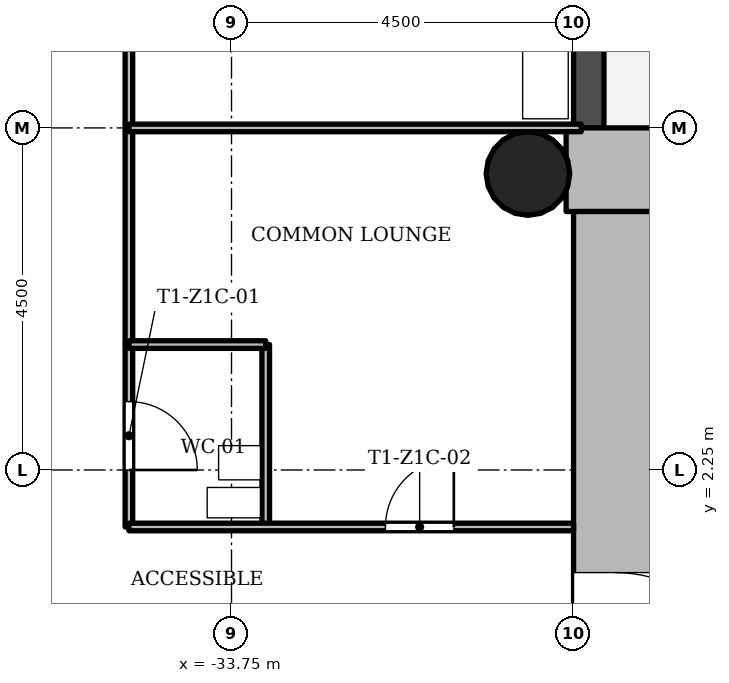
"""IFC4 building model, lengths in metres.
Left out: names, types, materials, properties, quantities, classifications, styles, units other than length and angle.
Written with IfcOpenShell. Run it as: python <this file> out.ifc"""

import sys

from ifc_helpers import new_model, si_unit, direction, frame, frame_2d, origin, origin_2d, place, context, subcontext, project, spatial, rectangle, hollow_circle, extrude, element, fill, save


model = new_model("IFC4")
c1 = context("Model", 3, precision=1e-05, world=origin(), true_north=direction((0.0, 1.0)))
c2 = subcontext(c1, "Body", "Model", "MODEL_VIEW")
j1 = project(units=[si_unit("LENGTHUNIT", "METRE"), si_unit("PLANEANGLEUNIT", "RADIAN")], contexts=[c1])
p1 = place(None, origin())
s1 = spatial("IfcSite", under=j1, at=p1, CompositionType="ELEMENT")
p2 = place(p1, origin())
s2 = spatial("IfcBuilding", under=s1, at=p2, CompositionType="ELEMENT")
p3 = place(p2, frame((0.0, 0.0, 51.7)))
s3 = spatial("IfcBuildingStorey", under=s2, at=p3, CompositionType="ELEMENT", Elevation=51.7)
p4 = place(p3, frame((-21.35, 6.2, 0.0), z_axis=(0.0, 0.0, 1.0), x_axis=(-1.0, 0.0, 0.0)))
e1 = element("IfcWall", 1, at=p4, inside=s3, PredefinedType="SHEAR", context=c2, shape_type="SweptSolid", body=[
    extrude(rectangle(XDim=7.998, YDim=1.1, at=frame_2d((3.999, 0.0))), origin(), (0.0, 0.0, 1.0), 3.4),
])
p5 = place(p3, frame((-28.7, 5.65, 0.0), z_axis=(0.0, 0.0, 1.0), x_axis=(0.0, -1.0, 0.0)))
e2 = element("IfcWall", 2, at=p5, inside=s3, PredefinedType="SHEAR", context=c2, shape_type="SweptSolid", body=[
    extrude(rectangle(XDim=12.4, YDim=1.1, at=frame_2d((6.2, 0.0))), origin(), (0.0, 0.0, 1.0), 3.4),
])
p6 = place(p5, frame((4.75, 0.0, 0.0)))
e3 = element("IfcOpeningElement", 3, at=p6, cuts=e2, PredefinedType="OPENING", context=c2, shape_type="SweptSolid", body=[
    extrude(rectangle(XDim=1.8, YDim=2.1, at=frame_2d((0.9, 1.05))), frame((0.0, 0.56, 0.0), z_axis=(0.0, -1.0, 0.0), x_axis=(1.0, 0.0, 0.0)), (0.0, 0.0, 1.0), 1.12),
])
p7 = place(p3, frame((-29.85, 6.15, 0.0), z_axis=(0.0, 0.0, 1.0), x_axis=(1.0, 0.0, 0.0)))
e4 = element("IfcColumn", 4, at=p7, inside=s3, PredefinedType="COLUMN", context=c2, shape_type="SweptSolid", body=[
    extrude(hollow_circle(Radius=0.55, WallThickness=0.04, at=origin_2d()), origin(), (0.0, 0.0, 1.0), 3.4),
])
p8 = place(p3, frame((-29.05, 6.75, -0.02), z_axis=(0.0, 0.0, 1.0), x_axis=(0.0, 1.0, 0.0)))
e5 = element("IfcWall", 5, at=p8, inside=s3, PredefinedType="STANDARD", context=c2, shape_type="SweptSolid", body=[
    extrude(rectangle(XDim=4.5, YDim=0.4, at=frame_2d((2.25, 0.0))), origin(), (0.0, 0.0, 1.0), 3.12),
])
p9 = place(p8, frame((1.35, 0.0, 0.02)))
e6 = element("IfcOpeningElement", 6, at=p9, cuts=e5, PredefinedType="OPENING", context=c2, shape_type="SweptSolid", body=[
    extrude(rectangle(XDim=1.8, YDim=2.1, at=frame_2d((0.9, 1.05))), frame((0.0, 0.21, 0.0), z_axis=(0.0, -1.0, 0.0), x_axis=(1.0, 0.0, 0.0)), (0.0, 0.0, 1.0), 0.42),
])
p10 = place(p3, frame((-35.1, 1.5, 0.0), z_axis=(0.0, 0.0, 1.0), x_axis=(0.0, 1.0, 0.0)))
e7 = element("IfcWall", 7, at=p10, inside=s3, PredefinedType="PARTITIONING", context=c2, shape_type="SweptSolid", body=[
    extrude(rectangle(XDim=7.05, YDim=0.1, at=frame_2d((3.525, 0.0))), origin(), (0.0, 0.0, 1.0), 3.0),
])
p11 = place(p10, frame((0.75, 0.0, 0.0)))
e8 = element("IfcOpeningElement", 8, at=p11, cuts=e7, PredefinedType="OPENING", context=c2, shape_type="SweptSolid", body=[
    extrude(rectangle(XDim=0.9, YDim=2.1, at=frame_2d((0.45, 1.05))), frame((0.0, 0.06, 0.0), z_axis=(0.0, -1.0, 0.0), x_axis=(1.0, 0.0, 0.0)), (0.0, 0.0, 1.0), 0.12),
])
p12 = place(p3, frame((-33.3, 1.5, 0.0), z_axis=(0.0, 0.0, 1.0), x_axis=(0.0, 1.0, 0.0)))
e9 = element("IfcWall", 9, at=p12, inside=s3, PredefinedType="PARTITIONING", context=c2, shape_type="SweptSolid", body=[
    extrude(rectangle(XDim=2.4, YDim=0.1, at=frame_2d((1.2, 0.0))), origin(), (0.0, 0.0, 1.0), 3.0),
])
p13 = place(p3, frame((-35.1, 1.5, 0.0), z_axis=(0.0, 0.0, 1.0), x_axis=(1.0, 0.0, 0.0)))
e10 = element("IfcWall", 10, at=p13, inside=s3, PredefinedType="PARTITIONING", context=c2, shape_type="SweptSolid", body=[
    extrude(rectangle(XDim=5.85, YDim=0.1, at=frame_2d((2.925, 0.0))), origin(), (0.0, 0.0, 1.0), 3.0),
])
p14 = place(p13, frame((3.375, 0.0, 0.0)))
e11 = element("IfcOpeningElement", 11, at=p14, cuts=e10, PredefinedType="OPENING", context=c2, shape_type="SweptSolid", body=[
    extrude(rectangle(XDim=0.9, YDim=2.1, at=frame_2d((0.45, 1.05))), frame((0.0, 0.06, 0.0), z_axis=(0.0, -1.0, 0.0), x_axis=(1.0, 0.0, 0.0)), (0.0, 0.0, 1.0), 0.12),
])
p15 = place(p3, frame((-35.1, 3.9, 0.0), z_axis=(0.0, 0.0, 1.0), x_axis=(1.0, 0.0, 0.0)))
e12 = element("IfcWall", 12, at=p15, inside=s3, PredefinedType="PARTITIONING", context=c2, shape_type="SweptSolid", body=[
    extrude(rectangle(XDim=1.8, YDim=0.1, at=frame_2d((0.9, 0.0))), origin(), (0.0, 0.0, 1.0), 3.0),
])
p16 = place(p3, frame((-35.1, 6.75, 0.0), z_axis=(0.0, 0.0, 1.0), x_axis=(1.0, 0.0, 0.0)))
e13 = element("IfcWall", 13, at=p16, inside=s3, PredefinedType="PARTITIONING", context=c2, shape_type="SweptSolid", body=[
    extrude(rectangle(XDim=5.95, YDim=0.1, at=frame_2d((2.975, 0.0))), origin(), (0.0, 0.0, 1.0), 3.0),
])
p17 = place(p11, origin())
e14 = element("IfcDoor", 14, at=p17, inside=s3, OperationType="SINGLE_SWING_LEFT", PredefinedType="DOOR", context=c2, shape_type="SweptSolid", body=[
    extrude(rectangle(XDim=0.9, YDim=2.1, at=frame_2d((0.45, 1.05))), frame((0.0, 0.025, 0.0), z_axis=(0.0, -1.0, 0.0), x_axis=(1.0, 0.0, 0.0)), (0.0, 0.0, 1.0), 0.05),
])
fill(e8, e14)
p18 = place(p14, origin())
e15 = element("IfcDoor", 15, at=p18, inside=s3, OperationType="SINGLE_SWING_LEFT", PredefinedType="DOOR", context=c2, shape_type="SweptSolid", body=[
    extrude(rectangle(XDim=0.9, YDim=2.1, at=frame_2d((0.45, 1.05))), frame((0.0, 0.025, 0.0), z_axis=(0.0, -1.0, 0.0), x_axis=(1.0, 0.0, 0.0)), (0.0, 0.0, 1.0), 0.05),
])
fill(e11, e15)
p19 = place(p6, origin())
e16 = element("IfcDoor", 16, at=p19, inside=s3, OperationType="SINGLE_SWING_LEFT", PredefinedType="DOOR", context=c2, shape_type="SweptSolid", body=[
    extrude(rectangle(XDim=1.8, YDim=2.1, at=frame_2d((0.9, 1.05))), frame((0.0, 0.025, 0.0), z_axis=(0.0, -1.0, 0.0), x_axis=(1.0, 0.0, 0.0)), (0.0, 0.0, 1.0), 0.05),
])
fill(e3, e16)
save(model, sys.argv[1])
